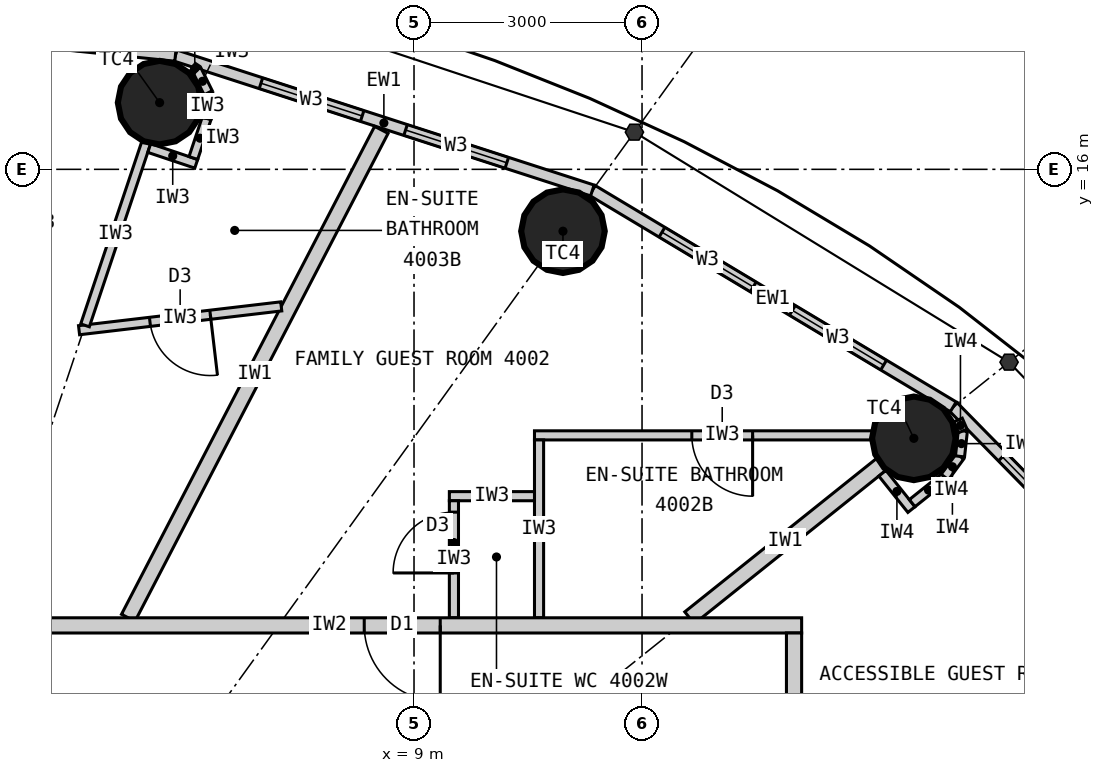
"""IFC4 building model, lengths in metres.
Left out: names, types, materials, properties, quantities, classifications, styles, units other than length and angle.
Written with IfcOpenShell. Run it as: python <this file> out.ifc"""

import sys

from ifc_helpers import new_model, si_unit, direction, frame, frame_2d, origin, origin_2d, place, context, subcontext, project, spatial, rectangle, circle, extrude, element, fill, save


model = new_model("IFC4")
c1 = context("Model", 3, precision=1e-05, world=origin(), true_north=direction((0.0, 1.0)))
c2 = subcontext(c1, "Body", "Model", "MODEL_VIEW")
j1 = project(units=[si_unit("LENGTHUNIT", "METRE"), si_unit("PLANEANGLEUNIT", "RADIAN")], contexts=[c1])
p1 = place(None, origin())
s1 = spatial("IfcSite", under=j1, at=p1, CompositionType="ELEMENT")
p2 = place(p1, origin())
s2 = spatial("IfcBuilding", under=s1, at=p2, CompositionType="ELEMENT")
p3 = place(p2, frame((0.0, 0.0, 153.3)))
s3 = spatial("IfcBuildingStorey", under=s2, at=p3, CompositionType="ELEMENT", Elevation=153.3)
for number, where, z_axis, x_axis in (
    (1, (15.576, 12.461, 0.0), (0.0, 0.0, 1.0), (1.0, 0.0, 0.0)),
    (2, (10.96, 15.186, 0.0), (0.0, 0.0, 1.0), (1.0, 0.0, 0.0)),
    (3, (5.653, 16.877, 0.0), (0.0, 0.0, 1.0), (1.0, 0.0, 0.0)),
):
    element("IfcColumn", number, at=place(p3, frame(where, z_axis=z_axis, x_axis=x_axis)), inside=s3, PredefinedType="COLUMN", context=c2, shape_type="SweptSolid", body=[
        extrude(circle(Radius=0.55, at=origin_2d()), origin(), (0.0, 0.0, 1.0), 3.3),
    ])
p4 = place(p3, frame((19.772, 9.132, 0.0), z_axis=(0.0, 0.0, 1.0), x_axis=(-0.700727467776, 0.71342905457, 0.0)))
e4 = element("IfcWall", 4, at=p4, inside=s3, PredefinedType="ELEMENTEDWALL", context=c2, shape_type="SweptSolid", body=[
    extrude(rectangle(XDim=5.247, YDim=0.15, at=frame_2d((2.624, 0.0))), origin(), (0.0, 0.0, 1.0), 3.12),
])
p5 = place(p4, frame((0.924, 0.0, 0.9)))
e5 = element("IfcOpeningElement", 5, at=p5, cuts=e4, PredefinedType="OPENING", context=c2, shape_type="SweptSolid", body=[
    extrude(rectangle(XDim=1.4, YDim=1.9, at=frame_2d((0.7, 0.95))), frame((0.0, 0.085, 0.0), z_axis=(0.0, -1.0, 0.0), x_axis=(1.0, 0.0, 0.0)), (0.0, 0.0, 1.0), 0.17),
])
p6 = place(p4, frame((2.924, 0.0, 0.9)))
e6 = element("IfcOpeningElement", 6, at=p6, cuts=e4, PredefinedType="OPENING", context=c2, shape_type="SweptSolid", body=[
    extrude(rectangle(XDim=1.4, YDim=1.9, at=frame_2d((0.7, 0.95))), frame((0.0, 0.085, 0.0), z_axis=(0.0, -1.0, 0.0), x_axis=(1.0, 0.0, 0.0)), (0.0, 0.0, 1.0), 0.17),
])
p7 = place(p3, frame((16.095, 12.876, 0.0), z_axis=(0.0, 0.0, 1.0), x_axis=(-0.857695199231, 0.514158482587, 0.0)))
e7 = element("IfcWall", 7, at=p7, inside=s3, PredefinedType="ELEMENTEDWALL", context=c2, shape_type="SweptSolid", body=[
    extrude(rectangle(XDim=5.536, YDim=0.15, at=frame_2d((2.768, 0.0))), origin(), (0.0, 0.0, 1.0), 3.12),
])
p8 = place(p7, frame((1.068, 0.0, 0.9)))
e8 = element("IfcOpeningElement", 8, at=p8, cuts=e7, PredefinedType="OPENING", context=c2, shape_type="SweptSolid", body=[
    extrude(rectangle(XDim=1.4, YDim=1.9, at=frame_2d((0.7, 0.95))), frame((0.0, 0.085, 0.0), z_axis=(0.0, -1.0, 0.0), x_axis=(1.0, 0.0, 0.0)), (0.0, 0.0, 1.0), 0.17),
])
p9 = place(p7, frame((3.068, 0.0, 0.9)))
e9 = element("IfcOpeningElement", 9, at=p9, cuts=e7, PredefinedType="OPENING", context=c2, shape_type="SweptSolid", body=[
    extrude(rectangle(XDim=1.4, YDim=1.9, at=frame_2d((0.7, 0.95))), frame((0.0, 0.085, 0.0), z_axis=(0.0, -1.0, 0.0), x_axis=(1.0, 0.0, 0.0)), (0.0, 0.0, 1.0), 0.17),
])
p10 = place(p3, frame((11.346, 15.722, 0.0), z_axis=(0.0, 0.0, 1.0), x_axis=(-0.951432482129, 0.307857486429, 0.0)))
e10 = element("IfcWall", 10, at=p10, inside=s3, PredefinedType="ELEMENTEDWALL", context=c2, shape_type="SweptSolid", body=[
    extrude(rectangle(XDim=5.766, YDim=0.15, at=frame_2d((2.883, 0.0))), origin(), (0.0, 0.0, 1.0), 3.12),
])
p11 = place(p10, frame((1.183, 0.0, 0.9)))
e11 = element("IfcOpeningElement", 11, at=p11, cuts=e10, PredefinedType="OPENING", context=c2, shape_type="SweptSolid", body=[
    extrude(rectangle(XDim=1.4, YDim=1.9, at=frame_2d((0.7, 0.95))), frame((0.0, 0.085, 0.0), z_axis=(0.0, -1.0, 0.0), x_axis=(1.0, 0.0, 0.0)), (0.0, 0.0, 1.0), 0.17),
])
p12 = place(p10, frame((3.183, 0.0, 0.9)))
e12 = element("IfcOpeningElement", 12, at=p12, cuts=e10, PredefinedType="OPENING", context=c2, shape_type="SweptSolid", body=[
    extrude(rectangle(XDim=1.4, YDim=1.9, at=frame_2d((0.7, 0.95))), frame((0.0, 0.085, 0.0), z_axis=(0.0, -1.0, 0.0), x_axis=(1.0, 0.0, 0.0)), (0.0, 0.0, 1.0), 0.17),
])
p13 = place(p3, frame((5.86, 17.497, 0.0), z_axis=(0.0, 0.0, 1.0), x_axis=(-0.994751738032, 0.102318032045, 0.0)))
e13 = element("IfcWall", 13, at=p13, inside=s3, PredefinedType="ELEMENTEDWALL", context=c2, shape_type="SweptSolid", body=[
    extrude(rectangle(XDim=5.891, YDim=0.15, at=frame_2d((2.946, 0.0))), origin(), (0.0, 0.0, 1.0), 3.12),
])
p14 = place(p13, frame((1.246, 0.0, 0.9)))
e14 = element("IfcOpeningElement", 14, at=p14, cuts=e13, PredefinedType="OPENING", context=c2, shape_type="SweptSolid", body=[
    extrude(rectangle(XDim=1.4, YDim=1.9, at=frame_2d((0.7, 0.95))), frame((0.0, 0.085, 0.0), z_axis=(0.0, -1.0, 0.0), x_axis=(1.0, 0.0, 0.0)), (0.0, 0.0, 1.0), 0.17),
])
p15 = place(p13, frame((3.246, 0.0, 0.9)))
e15 = element("IfcOpeningElement", 15, at=p15, cuts=e13, PredefinedType="OPENING", context=c2, shape_type="SweptSolid", body=[
    extrude(rectangle(XDim=1.4, YDim=1.9, at=frame_2d((0.7, 0.95))), frame((0.0, 0.085, 0.0), z_axis=(0.0, -1.0, 0.0), x_axis=(1.0, 0.0, 0.0)), (0.0, 0.0, 1.0), 0.17),
])
p16 = place(p3, frame((12.625, 10.1, 0.0), z_axis=(0.0, 0.0, 1.0), x_axis=(0.780876185034, 0.624685827954, 0.0)))
e16 = element("IfcWall", 16, at=p16, inside=s3, PredefinedType="PARTITIONING", context=c2, shape_type="SweptSolid", body=[
    extrude(rectangle(XDim=3.229, YDim=0.2, at=frame_2d((1.615, 0.0))), origin(), (0.0, 0.0, 1.0), 2.42),
])
p17 = place(p3, frame((5.24, 10.1, 0.0), z_axis=(0.0, 0.0, 1.0), x_axis=(0.460532965373, 0.887642601391, 0.0)))
e17 = element("IfcWall", 17, at=p17, inside=s3, PredefinedType="PARTITIONING", context=c2, shape_type="SweptSolid", body=[
    extrude(rectangle(XDim=7.231, YDim=0.2, at=frame_2d((3.616, 0.0))), origin(), (0.0, 0.0, 1.0), 3.12),
])
p18 = place(p3, frame((15.525, 12.5, 0.0), z_axis=(0.0, 0.0, 1.0), x_axis=(-1.0, 0.0, 0.0)))
e18 = element("IfcWall", 18, at=p18, inside=s3, PredefinedType="PARTITIONING", context=c2, shape_type="SweptSolid", body=[
    extrude(rectangle(XDim=4.94, YDim=0.12, at=frame_2d((2.47, 0.0))), origin(), (0.0, 0.0, 1.0), 3.12),
])
p19 = place(p18, frame((2.07, 0.0, 0.0)))
e19 = element("IfcOpeningElement", 19, at=p19, cuts=e18, PredefinedType="OPENING", context=c2, shape_type="SweptSolid", body=[
    extrude(rectangle(XDim=0.8, YDim=2.1, at=frame_2d((0.4, 1.05))), frame((0.0, 0.07, 0.0), z_axis=(0.0, -1.0, 0.0), x_axis=(1.0, 0.0, 0.0)), (0.0, 0.0, 1.0), 0.14),
])
p20 = place(p3, frame((10.645, 10.1, 0.0), z_axis=(0.0, 0.0, 1.0), x_axis=(0.0, 1.0, 0.0)))
e20 = element("IfcWall", 20, at=p20, inside=s3, PredefinedType="PARTITIONING", context=c2, shape_type="SweptSolid", body=[
    extrude(rectangle(XDim=2.34, YDim=0.12, at=frame_2d((1.17, 0.0))), origin(), (0.0, 0.0, 1.0), 3.12),
])
p21 = place(p3, frame((10.585, 11.7, 0.0), z_axis=(0.0, 0.0, 1.0), x_axis=(-1.0, 0.0, 0.0)))
e21 = element("IfcWall", 21, at=p21, inside=s3, PredefinedType="PARTITIONING", context=c2, shape_type="SweptSolid", body=[
    extrude(rectangle(XDim=1.12, YDim=0.12, at=frame_2d((0.56, 0.0))), origin(), (0.0, 0.0, 1.0), 3.12),
])
p22 = place(p3, frame((9.525, 10.1, 0.0), z_axis=(0.0, 0.0, 1.0), x_axis=(0.0, 1.0, 0.0)))
e22 = element("IfcWall", 22, at=p22, inside=s3, PredefinedType="PARTITIONING", context=c2, shape_type="SweptSolid", body=[
    extrude(rectangle(XDim=1.54, YDim=0.12, at=frame_2d((0.77, 0.0))), origin(), (0.0, 0.0, 1.0), 3.12),
])
p23 = place(p22, frame((0.59, 0.0, 0.0)))
e23 = element("IfcOpeningElement", 23, at=p23, cuts=e22, PredefinedType="OPENING", context=c2, shape_type="SweptSolid", body=[
    extrude(rectangle(XDim=0.8, YDim=2.1, at=frame_2d((0.4, 1.05))), frame((0.0, 0.07, 0.0), z_axis=(0.0, -1.0, 0.0), x_axis=(1.0, 0.0, 0.0)), (0.0, 0.0, 1.0), 0.14),
])
p24 = place(p3, frame((7.253, 14.197, 0.0), z_axis=(0.0, 0.0, 1.0), x_axis=(-0.993128188393, -0.117031625725, 0.0)))
e24 = element("IfcWall", 24, at=p24, inside=s3, PredefinedType="PARTITIONING", context=c2, shape_type="SweptSolid", body=[
    extrude(rectangle(XDim=2.678, YDim=0.12, at=frame_2d((1.339, 0.0))), origin(), (0.0, 0.0, 1.0), 3.12),
])
p25 = place(p24, frame((0.939, 0.0, 0.0)))
e25 = element("IfcOpeningElement", 25, at=p25, cuts=e24, PredefinedType="OPENING", context=c2, shape_type="SweptSolid", body=[
    extrude(rectangle(XDim=0.8, YDim=2.1, at=frame_2d((0.4, 1.05))), frame((0.0, 0.07, 0.0), z_axis=(0.0, -1.0, 0.0), x_axis=(1.0, 0.0, 0.0)), (0.0, 0.0, 1.0), 0.14),
])
p26 = place(p3, frame((4.671, 13.948, 0.0), z_axis=(0.0, 0.0, 1.0), x_axis=(0.317669167093, 0.948201613729, 0.0)))
e26 = element("IfcWall", 26, at=p26, inside=s3, PredefinedType="PARTITIONING", context=c2, shape_type="SweptSolid", body=[
    extrude(rectangle(XDim=2.54, YDim=0.12, at=frame_2d((1.27, 0.0))), origin(), (0.0, 0.0, 1.0), 2.42),
])
p27 = place(p3, frame((5.516, 16.28, 0.0), z_axis=(0.0, 0.0, 1.0), x_axis=(0.948157944392, -0.317799484717, 0.0)))
e27 = element("IfcWall", 27, at=p27, inside=s3, PredefinedType="PARTITIONING", context=c2, shape_type="SweptSolid", body=[
    extrude(rectangle(XDim=0.652, YDim=0.12, at=frame_2d((0.326, 0.0))), origin(), (0.0, 0.0, 1.0), 3.12),
])
p28 = place(p3, frame((6.097, 16.149, 0.0), z_axis=(0.0, 0.0, 1.0), x_axis=(0.317292604854, 0.948327687514, 0.0)))
e28 = element("IfcWall", 28, at=p28, inside=s3, PredefinedType="PARTITIONING", context=c2, shape_type="SweptSolid", body=[
    extrude(rectangle(XDim=0.55, YDim=0.12, at=frame_2d((0.275, 0.0))), origin(), (0.0, 0.0, 1.0), 3.12),
])
for number, where, z_axis, x_axis in (
    (29, (6.271, 16.67, 0.0), (0.0, 0.0, 1.0), (0.061, 0.998, 0.0)),
    (30, (6.292, 17.007, 0.0), (0.0, 0.0, 1.0), (-0.445, 0.895, 0.0)),
):
    element("IfcWall", number, at=place(p3, frame(where, z_axis=z_axis, x_axis=x_axis)), inside=s3, PredefinedType="PARTITIONING", context=c2, shape_type="SweptSolid", body=[
        extrude(rectangle(XDim=0.338, YDim=0.12, at=frame_2d((0.169, 0.0))), origin(), (0.0, 0.0, 1.0), 3.12),
    ])
p29 = place(p3, frame((6.142, 17.31, 0.0), z_axis=(0.0, 0.0, 1.0), x_axis=(-0.835039693181, 0.550189704386, 0.0)))
e31 = element("IfcWall", 31, at=p29, inside=s3, PredefinedType="PARTITIONING", context=c2, shape_type="SweptSolid", body=[
    extrude(rectangle(XDim=0.062, YDim=0.12, at=frame_2d((0.031, 0.0))), origin(), (0.0, 0.0, 1.0), 3.12),
])
p30 = place(p3, frame((1.67, 10.0, 0.0), z_axis=(0.0, 0.0, 1.0), x_axis=(1.0, 0.0, 0.0)))
e32 = element("IfcWall", 32, at=p30, inside=s3, PredefinedType="PARTITIONING", context=c2, shape_type="SweptSolid", body=[
    extrude(rectangle(XDim=12.43, YDim=0.2, at=frame_2d((6.215, 0.0))), origin(), (0.0, 0.0, 1.0), 3.12),
])
p31 = place(p30, frame((6.675, 0.0, 0.0)))
e33 = element("IfcOpeningElement", 33, at=p31, cuts=e32, PredefinedType="OPENING", context=c2, shape_type="SweptSolid", body=[
    extrude(rectangle(XDim=1.0, YDim=2.2, at=frame_2d((0.5, 1.1))), frame((0.0, 0.11, 0.0), z_axis=(0.0, -1.0, 0.0), x_axis=(1.0, 0.0, 0.0)), (0.0, 0.0, 1.0), 0.22),
])
p32 = place(p3, frame((14.0, 1.67, 0.0), z_axis=(0.0, 0.0, 1.0), x_axis=(0.0, 1.0, 0.0)))
e34 = element("IfcWall", 34, at=p32, inside=s3, PredefinedType="PARTITIONING", context=c2, shape_type="SweptSolid", body=[
    extrude(rectangle(XDim=8.23, YDim=0.2, at=frame_2d((4.115, 0.0))), origin(), (0.0, 0.0, 1.0), 3.12),
])
p33 = place(p32, frame((5.552, 0.0, 0.0)))
e35 = element("IfcOpeningElement", 35, at=p33, cuts=e34, PredefinedType="OPENING", context=c2, shape_type="SweptSolid", body=[
    extrude(rectangle(XDim=1.0, YDim=2.2, at=frame_2d((0.5, 1.1))), frame((0.0, 0.11, 0.0), z_axis=(0.0, -1.0, 0.0), x_axis=(1.0, 0.0, 0.0)), (0.0, 0.0, 1.0), 0.22),
])
p34 = place(p3, frame((15.162, 12.002, 0.0), z_axis=(0.0, 0.0, 1.0), x_axis=(0.624597762427, -0.780946627607, 0.0)))
e36 = element("IfcWall", 36, at=p34, inside=s3, PredefinedType="PARTITIONING", context=c2, shape_type="SweptSolid", body=[
    extrude(rectangle(XDim=0.612, YDim=0.12, at=frame_2d((0.306, 0.0))), origin(), (0.0, 0.0, 1.0), 3.12),
])
p35 = place(p3, frame((15.554, 11.608, 0.0), z_axis=(0.0, 0.0, 1.0), x_axis=(0.780695577787, 0.624911525597, 0.0)))
e37 = element("IfcWall", 37, at=p35, inside=s3, PredefinedType="PARTITIONING", context=c2, shape_type="SweptSolid", body=[
    extrude(rectangle(XDim=0.55, YDim=0.12, at=frame_2d((0.275, 0.0))), origin(), (0.0, 0.0, 1.0), 3.12),
])
p36 = place(p3, frame((15.984, 11.952, 0.0), z_axis=(0.0, 0.0, 1.0), x_axis=(0.592335221171, 0.805691619517, 0.0)))
e38 = element("IfcWall", 38, at=p36, inside=s3, PredefinedType="PARTITIONING", context=c2, shape_type="SweptSolid", body=[
    extrude(rectangle(XDim=0.338, YDim=0.12, at=frame_2d((0.169, 0.0))), origin(), (0.0, 0.0, 1.0), 3.12),
])
p37 = place(p3, frame((16.184, 12.224, 0.0), z_axis=(0.0, 0.0, 1.0), x_axis=(0.110669692975, 0.993857242795, 0.0)))
e39 = element("IfcWall", 39, at=p37, inside=s3, PredefinedType="PARTITIONING", context=c2, shape_type="SweptSolid", body=[
    extrude(rectangle(XDim=0.337, YDim=0.12, at=frame_2d((0.169, 0.0))), origin(), (0.0, 0.0, 1.0), 3.12),
])
p38 = place(p3, frame((16.221, 12.559, 0.0), z_axis=(0.0, 0.0, 1.0), x_axis=(-0.401064416249, 0.916049853457, 0.0)))
e40 = element("IfcWall", 40, at=p38, inside=s3, PredefinedType="PARTITIONING", context=c2, shape_type="SweptSolid", body=[
    extrude(rectangle(XDim=0.156, YDim=0.12, at=frame_2d((0.078, 0.0))), origin(), (0.0, 0.0, 1.0), 3.12),
])
p39 = place(p6, origin())
e41 = element("IfcWindow", 41, at=p39, inside=s3, PartitioningType="SINGLE_PANEL", PredefinedType="WINDOW", context=c2, shape_type="SweptSolid", body=[
    extrude(rectangle(XDim=1.4, YDim=1.9, at=frame_2d((0.7, 0.95))), frame((0.0, 0.03, 0.0), z_axis=(0.0, -1.0, 0.0), x_axis=(1.0, 0.0, 0.0)), (0.0, 0.0, 1.0), 0.06),
])
fill(e6, e41)
p40 = place(p8, origin())
e42 = element("IfcWindow", 42, at=p40, inside=s3, PartitioningType="SINGLE_PANEL", PredefinedType="WINDOW", context=c2, shape_type="SweptSolid", body=[
    extrude(rectangle(XDim=1.4, YDim=1.9, at=frame_2d((0.7, 0.95))), frame((0.0, 0.03, 0.0), z_axis=(0.0, -1.0, 0.0), x_axis=(1.0, 0.0, 0.0)), (0.0, 0.0, 1.0), 0.06),
])
fill(e8, e42)
p41 = place(p9, origin())
e43 = element("IfcWindow", 43, at=p41, inside=s3, PartitioningType="SINGLE_PANEL", PredefinedType="WINDOW", context=c2, shape_type="SweptSolid", body=[
    extrude(rectangle(XDim=1.4, YDim=1.9, at=frame_2d((0.7, 0.95))), frame((0.0, 0.03, 0.0), z_axis=(0.0, -1.0, 0.0), x_axis=(1.0, 0.0, 0.0)), (0.0, 0.0, 1.0), 0.06),
])
fill(e9, e43)
p42 = place(p11, origin())
e44 = element("IfcWindow", 44, at=p42, inside=s3, PartitioningType="SINGLE_PANEL", PredefinedType="WINDOW", context=c2, shape_type="SweptSolid", body=[
    extrude(rectangle(XDim=1.4, YDim=1.9, at=frame_2d((0.7, 0.95))), frame((0.0, 0.03, 0.0), z_axis=(0.0, -1.0, 0.0), x_axis=(1.0, 0.0, 0.0)), (0.0, 0.0, 1.0), 0.06),
])
fill(e11, e44)
p43 = place(p12, origin())
e45 = element("IfcWindow", 45, at=p43, inside=s3, PartitioningType="SINGLE_PANEL", PredefinedType="WINDOW", context=c2, shape_type="SweptSolid", body=[
    extrude(rectangle(XDim=1.4, YDim=1.9, at=frame_2d((0.7, 0.95))), frame((0.0, 0.03, 0.0), z_axis=(0.0, -1.0, 0.0), x_axis=(1.0, 0.0, 0.0)), (0.0, 0.0, 1.0), 0.06),
])
fill(e12, e45)
p44 = place(p19, origin())
e46 = element("IfcDoor", 46, at=p44, inside=s3, OperationType="SINGLE_SWING_LEFT", PredefinedType="DOOR", context=c2, shape_type="SweptSolid", body=[
    extrude(rectangle(XDim=0.8, YDim=2.1, at=frame_2d((0.4, 1.05))), frame((0.0, 0.025, 0.0), z_axis=(0.0, -1.0, 0.0), x_axis=(1.0, 0.0, 0.0)), (0.0, 0.0, 1.0), 0.05),
])
fill(e19, e46)
p45 = place(p23, origin())
e47 = element("IfcDoor", 47, at=p45, inside=s3, OperationType="SINGLE_SWING_LEFT", PredefinedType="DOOR", context=c2, shape_type="SweptSolid", body=[
    extrude(rectangle(XDim=0.8, YDim=2.1, at=frame_2d((0.4, 1.05))), frame((0.0, 0.025, 0.0), z_axis=(0.0, -1.0, 0.0), x_axis=(1.0, 0.0, 0.0)), (0.0, 0.0, 1.0), 0.05),
])
fill(e23, e47)
p46 = place(p31, origin())
e48 = element("IfcDoor", 48, at=p46, inside=s3, OperationType="SINGLE_SWING_RIGHT", PredefinedType="DOOR", context=c2, shape_type="SweptSolid", body=[
    extrude(rectangle(XDim=1.0, YDim=2.2, at=frame_2d((0.5, 1.1))), frame((0.0, 0.025, 0.0), z_axis=(0.0, -1.0, 0.0), x_axis=(1.0, 0.0, 0.0)), (0.0, 0.0, 1.0), 0.05),
])
fill(e33, e48)
p47 = place(p25, origin())
e49 = element("IfcDoor", 49, at=p47, inside=s3, OperationType="SINGLE_SWING_LEFT", PredefinedType="DOOR", context=c2, shape_type="SweptSolid", body=[
    extrude(rectangle(XDim=0.8, YDim=2.1, at=frame_2d((0.4, 1.05))), frame((0.0, 0.025, 0.0), z_axis=(0.0, -1.0, 0.0), x_axis=(1.0, 0.0, 0.0)), (0.0, 0.0, 1.0), 0.05),
])
fill(e25, e49)
save(model, sys.argv[1])
